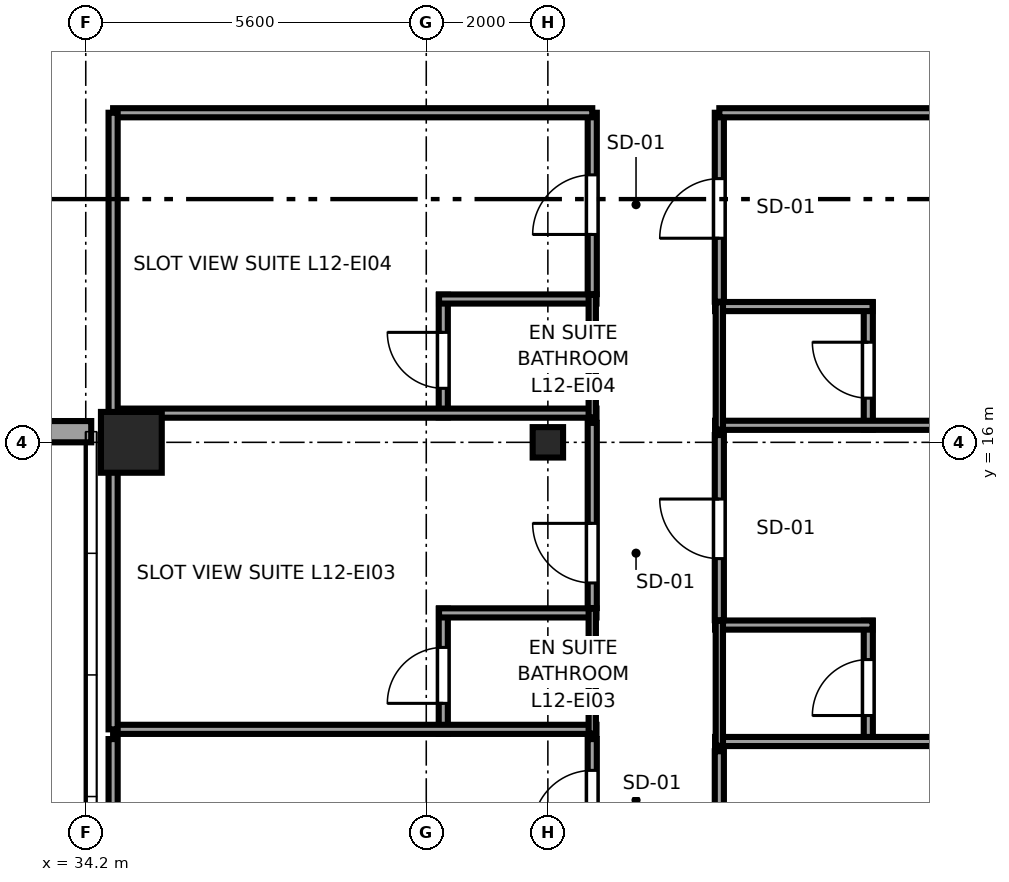
"""IFC4 building model, lengths in metres.
Left out: names, types, materials, properties, quantities, classifications, styles, units other than length and angle.
Written with IfcOpenShell. Run it as: python <this file> out.ifc"""

import sys

from ifc_helpers import new_model, si_unit, direction, frame, frame_2d, origin, origin_2d, place, context, subcontext, project, spatial, rectangle, i_section, extrude, source, transform, mapped, element, fill, save


model = new_model("IFC4")
c1 = context("Model", 3, precision=1e-05, world=origin(), true_north=direction((0.0, 1.0)))
c2 = subcontext(c1, "Body", "Model", "MODEL_VIEW")
j1 = project(units=[si_unit("LENGTHUNIT", "METRE"), si_unit("PLANEANGLEUNIT", "RADIAN")], contexts=[c1])
p1 = place(None, origin())
s1 = spatial("IfcSite", under=j1, at=p1, CompositionType="ELEMENT")
p2 = place(p1, origin())
s2 = spatial("IfcBuilding", under=s1, at=p2, CompositionType="ELEMENT")
p3 = place(p2, frame((0.0, 0.0, 53.3)))
s3 = spatial("IfcBuildingStorey", under=s2, at=p3, CompositionType="ELEMENT", Elevation=53.3)
m1 = source(origin(), c2, "Body", "SweptSolid", [
    extrude(rectangle(XDim=1.0, YDim=1.0, at=origin_2d()), origin(), (0.0, 0.0, 1.0), 3.55),
])
p4 = place(p3, frame((34.95, 16.0, 0.0), z_axis=(0.0, 0.0, 1.0), x_axis=(1.0, 0.0, 0.0)))
e1 = element("IfcColumn", 1, at=p4, inside=s3, PredefinedType="COLUMN", context=c2, shape_type="MappedRepresentation", body=[
    mapped(m1, transform((0.0, 0.0, 0.0), x_axis=(1.0, 0.0, 0.0), y_axis=(0.0, 1.0, 0.0), z_axis=(0.0, 0.0, 1.0), scale=1.0)),
])
m2 = source(origin(), c2, "Body", "SweptSolid", [
    extrude(i_section(OverallWidth=0.5, OverallDepth=0.5, WebThickness=0.028, FlangeThickness=0.045, at=origin_2d()), origin(), (0.0, 0.0, 1.0), 3.55),
])
p5 = place(p3, frame((41.8, 16.0, 0.0), z_axis=(0.0, 0.0, 1.0), x_axis=(1.0, 0.0, 0.0)))
e2 = element("IfcColumn", 2, at=p5, inside=s3, PredefinedType="COLUMN", context=c2, shape_type="MappedRepresentation", body=[
    mapped(m2, transform((0.0, 0.0, 0.0), x_axis=(1.0, 0.0, 0.0), y_axis=(0.0, 1.0, 0.0), z_axis=(0.0, 0.0, 1.0), scale=1.0)),
])
p6 = place(p3, frame((22.71, 16.175, 0.0), z_axis=(0.0, 0.0, 1.0), x_axis=(1.0, 0.0, 0.0)))
e3 = element("IfcWall", 3, at=p6, inside=s3, PredefinedType="SOLIDWALL", context=c2, shape_type="SweptSolid", body=[
    extrude(rectangle(XDim=11.58, YDim=0.35, at=frame_2d((5.79, 0.0))), origin(), (0.0, 0.0, 1.0), 2.748),
])
p7 = place(p6, frame((2.145, 0.0, 0.68)))
e4 = element("IfcOpeningElement", 4, at=p7, cuts=e3, PredefinedType="OPENING", context=c2, shape_type="SweptSolid", body=[
    extrude(rectangle(XDim=2.1, YDim=1.9, at=frame_2d((1.05, 0.95))), frame((0.0, 0.185, 0.0), z_axis=(0.0, -1.0, 0.0), x_axis=(1.0, 0.0, 0.0)), (0.0, 0.0, 1.0), 0.37),
])
p8 = place(p6, frame((7.335, 0.0, 0.68)))
e5 = element("IfcOpeningElement", 5, at=p8, cuts=e3, PredefinedType="OPENING", context=c2, shape_type="SweptSolid", body=[
    extrude(rectangle(XDim=2.1, YDim=1.9, at=frame_2d((1.05, 0.95))), frame((0.0, 0.185, 0.0), z_axis=(0.0, -1.0, 0.0), x_axis=(1.0, 0.0, 0.0)), (0.0, 0.0, 1.0), 0.37),
])
p9 = place(p3, frame((40.08, 11.21, 0.0), z_axis=(0.0, 0.0, 1.0), x_axis=(0.0, 1.0, 0.0)))
e6 = element("IfcWall", 6, at=p9, inside=s3, PredefinedType="PARTITIONING", context=c2, shape_type="SweptSolid", body=[
    extrude(rectangle(XDim=2.055, YDim=0.15, at=frame_2d((1.027, 0.0))), origin(), (0.0, 0.0, 1.0), 3.37),
])
p10 = place(p9, frame((0.498, 0.0, 0.0)))
e7 = element("IfcOpeningElement", 7, at=p10, cuts=e6, PredefinedType="OPENING", context=c2, shape_type="SweptSolid", body=[
    extrude(rectangle(XDim=0.92, YDim=2.01, at=frame_2d((0.46, 1.005))), frame((0.0, 0.085, 0.0), z_axis=(0.0, -1.0, 0.0), x_axis=(1.0, 0.0, 0.0)), (0.0, 0.0, 1.0), 0.17),
])
p11 = place(p3, frame((34.65, 11.28, 0.0), z_axis=(0.0, 0.0, 1.0), x_axis=(1.0, 0.0, 0.0)))
e8 = element("IfcWall", 8, at=p11, inside=s3, PredefinedType="PARTITIONING", context=c2, shape_type="SweptSolid", body=[
    extrude(rectangle(XDim=7.95, YDim=0.15, at=frame_2d((3.975, 0.0))), origin(), (0.0, 0.0, 1.0), 3.37),
])
p12 = place(p3, frame((40.01, 13.195, 0.0), z_axis=(0.0, 0.0, 1.0), x_axis=(1.0, 0.0, 0.0)))
e9 = element("IfcWall", 9, at=p12, inside=s3, PredefinedType="PARTITIONING", context=c2, shape_type="SweptSolid", body=[
    extrude(rectangle(XDim=2.59, YDim=0.15, at=frame_2d((1.295, 0.0))), origin(), (0.0, 0.0, 1.0), 3.37),
])
p13 = place(p3, frame((42.53, 11.21, 0.0), z_axis=(0.0, 0.0, 1.0), x_axis=(0.0, 1.0, 0.0)))
e10 = element("IfcWall", 10, at=p13, inside=s3, PredefinedType="PLUMBINGWALL", context=c2, shape_type="SweptSolid", body=[
    extrude(rectangle(XDim=2.055, YDim=0.12, at=frame_2d((1.027, 0.0))), origin(), (0.0, 0.0, 1.0), 3.37),
])
p14 = place(p3, frame((40.08, 16.41, 0.0), z_axis=(0.0, 0.0, 1.0), x_axis=(0.0, 1.0, 0.0)))
e11 = element("IfcWall", 11, at=p14, inside=s3, PredefinedType="PARTITIONING", context=c2, shape_type="SweptSolid", body=[
    extrude(rectangle(XDim=2.017, YDim=0.15, at=frame_2d((1.009, 0.0))), origin(), (0.0, 0.0, 1.0), 3.37),
])
p15 = place(p14, frame((0.479, 0.0, 0.0)))
e12 = element("IfcOpeningElement", 12, at=p15, cuts=e11, PredefinedType="OPENING", context=c2, shape_type="SweptSolid", body=[
    extrude(rectangle(XDim=0.92, YDim=2.01, at=frame_2d((0.46, 1.005))), frame((0.0, 0.085, 0.0), z_axis=(0.0, -1.0, 0.0), x_axis=(1.0, 0.0, 0.0)), (0.0, 0.0, 1.0), 0.17),
])
p16 = place(p3, frame((34.65, 16.48, 0.0), z_axis=(0.0, 0.0, 1.0), x_axis=(1.0, 0.0, 0.0)))
e13 = element("IfcWall", 13, at=p16, inside=s3, PredefinedType="PARTITIONING", context=c2, shape_type="SweptSolid", body=[
    extrude(rectangle(XDim=7.95, YDim=0.15, at=frame_2d((3.975, 0.0))), origin(), (0.0, 0.0, 1.0), 3.37),
])
p17 = place(p3, frame((40.01, 18.357, 0.0), z_axis=(0.0, 0.0, 1.0), x_axis=(1.0, 0.0, 0.0)))
e14 = element("IfcWall", 14, at=p17, inside=s3, PredefinedType="PARTITIONING", context=c2, shape_type="SweptSolid", body=[
    extrude(rectangle(XDim=2.59, YDim=0.15, at=frame_2d((1.295, 0.0))), origin(), (0.0, 0.0, 1.0), 3.37),
])
p18 = place(p3, frame((42.53, 16.41, 0.0), z_axis=(0.0, 0.0, 1.0), x_axis=(0.0, 1.0, 0.0)))
e15 = element("IfcWall", 15, at=p18, inside=s3, PredefinedType="PLUMBINGWALL", context=c2, shape_type="SweptSolid", body=[
    extrude(rectangle(XDim=2.017, YDim=0.12, at=frame_2d((1.009, 0.0))), origin(), (0.0, 0.0, 1.0), 3.37),
])
p19 = place(p3, frame((47.07, 11.01, 0.0), z_axis=(0.0, 0.0, 1.0), x_axis=(0.0, 1.0, 0.0)))
e16 = element("IfcWall", 16, at=p19, inside=s3, PredefinedType="PARTITIONING", context=c2, shape_type="SweptSolid", body=[
    extrude(rectangle(XDim=2.055, YDim=0.15, at=frame_2d((1.027, 0.0))), origin(), (0.0, 0.0, 1.0), 3.37),
])
p20 = place(p19, frame((0.498, 0.0, 0.0)))
e17 = element("IfcOpeningElement", 17, at=p20, cuts=e16, PredefinedType="OPENING", context=c2, shape_type="SweptSolid", body=[
    extrude(rectangle(XDim=0.92, YDim=2.01, at=frame_2d((0.46, 1.005))), frame((0.0, 0.085, 0.0), z_axis=(0.0, -1.0, 0.0), x_axis=(1.0, 0.0, 0.0)), (0.0, 0.0, 1.0), 0.17),
])
p21 = place(p3, frame((44.55, 11.08, 0.0), z_axis=(0.0, 0.0, 1.0), x_axis=(1.0, 0.0, 0.0)))
e18 = element("IfcWall", 18, at=p21, inside=s3, PredefinedType="PARTITIONING", context=c2, shape_type="SweptSolid", body=[
    extrude(rectangle(XDim=12.045, YDim=0.15, at=frame_2d((6.022, 0.0))), origin(), (0.0, 0.0, 1.0), 3.37),
])
p22 = place(p3, frame((44.55, 12.995, 0.0), z_axis=(0.0, 0.0, 1.0), x_axis=(1.0, 0.0, 0.0)))
e19 = element("IfcWall", 19, at=p22, inside=s3, PredefinedType="PARTITIONING", context=c2, shape_type="SweptSolid", body=[
    extrude(rectangle(XDim=2.59, YDim=0.15, at=frame_2d((1.295, 0.0))), origin(), (0.0, 0.0, 1.0), 3.37),
])
p23 = place(p3, frame((44.62, 11.01, 0.0), z_axis=(0.0, 0.0, 1.0), x_axis=(0.0, 1.0, 0.0)))
e20 = element("IfcWall", 20, at=p23, inside=s3, PredefinedType="PLUMBINGWALL", context=c2, shape_type="SweptSolid", body=[
    extrude(rectangle(XDim=2.055, YDim=0.12, at=frame_2d((1.027, 0.0))), origin(), (0.0, 0.0, 1.0), 3.37),
])
p24 = place(p3, frame((47.07, 16.21, 0.0), z_axis=(0.0, 0.0, 1.0), x_axis=(0.0, 1.0, 0.0)))
e21 = element("IfcWall", 21, at=p24, inside=s3, PredefinedType="PARTITIONING", context=c2, shape_type="SweptSolid", body=[
    extrude(rectangle(XDim=2.093, YDim=0.15, at=frame_2d((1.046, 0.0))), origin(), (0.0, 0.0, 1.0), 3.37),
])
p25 = place(p24, frame((0.517, 0.0, 0.0)))
e22 = element("IfcOpeningElement", 22, at=p25, cuts=e21, PredefinedType="OPENING", context=c2, shape_type="SweptSolid", body=[
    extrude(rectangle(XDim=0.92, YDim=2.01, at=frame_2d((0.46, 1.005))), frame((0.0, 0.085, 0.0), z_axis=(0.0, -1.0, 0.0), x_axis=(1.0, 0.0, 0.0)), (0.0, 0.0, 1.0), 0.17),
])
p26 = place(p3, frame((44.55, 16.28, 0.0), z_axis=(0.0, 0.0, 1.0), x_axis=(1.0, 0.0, 0.0)))
e23 = element("IfcWall", 23, at=p26, inside=s3, PredefinedType="PARTITIONING", context=c2, shape_type="SweptSolid", body=[
    extrude(rectangle(XDim=12.045, YDim=0.15, at=frame_2d((6.022, 0.0))), origin(), (0.0, 0.0, 1.0), 3.37),
])
p27 = place(p3, frame((44.55, 18.233, 0.0), z_axis=(0.0, 0.0, 1.0), x_axis=(1.0, 0.0, 0.0)))
e24 = element("IfcWall", 24, at=p27, inside=s3, PredefinedType="PARTITIONING", context=c2, shape_type="SweptSolid", body=[
    extrude(rectangle(XDim=2.59, YDim=0.15, at=frame_2d((1.295, 0.0))), origin(), (0.0, 0.0, 1.0), 3.37),
])
p28 = place(p3, frame((44.62, 16.21, 0.0), z_axis=(0.0, 0.0, 1.0), x_axis=(0.0, 1.0, 0.0)))
e25 = element("IfcWall", 25, at=p28, inside=s3, PredefinedType="PLUMBINGWALL", context=c2, shape_type="SweptSolid", body=[
    extrude(rectangle(XDim=2.093, YDim=0.12, at=frame_2d((1.046, 0.0))), origin(), (0.0, 0.0, 1.0), 3.37),
])
p29 = place(p3, frame((42.53, 7.951, 0.0), z_axis=(0.0, 0.0, 1.0), x_axis=(0.0, 1.0, 0.0)))
e26 = element("IfcWall", 26, at=p29, inside=s3, PredefinedType="PARTITIONING", context=c2, shape_type="SweptSolid", body=[
    extrude(rectangle(XDim=3.169, YDim=0.15, at=frame_2d((1.584, 0.0))), origin(), (0.0, 0.0, 1.0), 3.37),
])
p30 = place(p29, frame((1.675, 0.0, 0.0)))
e27 = element("IfcOpeningElement", 27, at=p30, cuts=e26, PredefinedType="OPENING", context=c2, shape_type="SweptSolid", body=[
    extrude(rectangle(XDim=0.98, YDim=2.12, at=frame_2d((0.49, 1.06))), frame((0.0, 0.085, 0.0), z_axis=(0.0, -1.0, 0.0), x_axis=(1.0, 0.0, 0.0)), (0.0, 0.0, 1.0), 0.17),
])
p31 = place(p3, frame((34.65, 5.88, 0.0), z_axis=(0.0, 0.0, 1.0), x_axis=(0.0, 1.0, 0.0)))
e28 = element("IfcWall", 28, at=p31, inside=s3, PredefinedType="PARTITIONING", context=c2, shape_type="SweptSolid", body=[
    extrude(rectangle(XDim=5.24, YDim=0.15, at=frame_2d((2.62, 0.0))), origin(), (0.0, 0.0, 1.0), 3.37),
])
p32 = place(p3, frame((42.53, 13.275, 0.0), z_axis=(0.0, 0.0, 1.0), x_axis=(0.0, 1.0, 0.0)))
e29 = element("IfcWall", 29, at=p32, inside=s3, PredefinedType="PARTITIONING", context=c2, shape_type="SweptSolid", body=[
    extrude(rectangle(XDim=3.045, YDim=0.15, at=frame_2d((1.522, 0.0))), origin(), (0.0, 0.0, 1.0), 3.37),
])
p33 = place(p32, frame((0.413, 0.0, 0.0)))
e30 = element("IfcOpeningElement", 30, at=p33, cuts=e29, PredefinedType="OPENING", context=c2, shape_type="SweptSolid", body=[
    extrude(rectangle(XDim=0.98, YDim=2.12, at=frame_2d((0.49, 1.06))), frame((0.0, 0.085, 0.0), z_axis=(0.0, -1.0, 0.0), x_axis=(1.0, 0.0, 0.0)), (0.0, 0.0, 1.0), 0.17),
])
p34 = place(p3, frame((34.65, 11.28, 0.0), z_axis=(0.0, 0.0, 1.0), x_axis=(0.0, 1.0, 0.0)))
e31 = element("IfcWall", 31, at=p34, inside=s3, PredefinedType="PARTITIONING", context=c2, shape_type="SweptSolid", body=[
    extrude(rectangle(XDim=5.04, YDim=0.15, at=frame_2d((2.52, 0.0))), origin(), (0.0, 0.0, 1.0), 3.37),
])
p35 = place(p3, frame((42.53, 18.437, 0.0), z_axis=(0.0, 0.0, 1.0), x_axis=(0.0, 1.0, 0.0)))
e32 = element("IfcWall", 32, at=p35, inside=s3, PredefinedType="PARTITIONING", context=c2, shape_type="SweptSolid", body=[
    extrude(rectangle(XDim=2.983, YDim=0.15, at=frame_2d((1.491, 0.0))), origin(), (0.0, 0.0, 1.0), 3.37),
])
p36 = place(p35, frame((0.981, 0.0, 0.0)))
e33 = element("IfcOpeningElement", 33, at=p36, cuts=e32, PredefinedType="OPENING", context=c2, shape_type="SweptSolid", body=[
    extrude(rectangle(XDim=0.98, YDim=2.12, at=frame_2d((0.49, 1.06))), frame((0.0, 0.085, 0.0), z_axis=(0.0, -1.0, 0.0), x_axis=(1.0, 0.0, 0.0)), (0.0, 0.0, 1.0), 0.17),
])
p37 = place(p3, frame((34.65, 21.42, 0.0), z_axis=(0.0, 0.0, 1.0), x_axis=(1.0, 0.0, 0.0)))
e34 = element("IfcWall", 34, at=p37, inside=s3, PredefinedType="PARTITIONING", context=c2, shape_type="SweptSolid", body=[
    extrude(rectangle(XDim=7.88, YDim=0.15, at=frame_2d((3.94, 0.0))), origin(), (0.0, 0.0, 1.0), 3.37),
])
p38 = place(p3, frame((34.65, 16.48, 0.0), z_axis=(0.0, 0.0, 1.0), x_axis=(0.0, 1.0, 0.0)))
e35 = element("IfcWall", 35, at=p38, inside=s3, PredefinedType="PARTITIONING", context=c2, shape_type="SweptSolid", body=[
    extrude(rectangle(XDim=4.94, YDim=0.15, at=frame_2d((2.47, 0.0))), origin(), (0.0, 0.0, 1.0), 3.37),
])
p39 = place(p3, frame((44.62, 7.751, 0.0), z_axis=(0.0, 0.0, 1.0), x_axis=(0.0, 1.0, 0.0)))
e36 = element("IfcWall", 36, at=p39, inside=s3, PredefinedType="PARTITIONING", context=c2, shape_type="SweptSolid", body=[
    extrude(rectangle(XDim=3.169, YDim=0.15, at=frame_2d((1.584, 0.0))), origin(), (0.0, 0.0, 1.0), 3.37),
])
p40 = place(p39, frame((1.074, 0.0, 0.0)))
e37 = element("IfcOpeningElement", 37, at=p40, cuts=e36, PredefinedType="OPENING", context=c2, shape_type="SweptSolid", body=[
    extrude(rectangle(XDim=0.98, YDim=2.12, at=frame_2d((0.49, 1.06))), frame((0.0, 0.085, 0.0), z_axis=(0.0, -1.0, 0.0), x_axis=(1.0, 0.0, 0.0)), (0.0, 0.0, 1.0), 0.17),
])
p41 = place(p3, frame((44.62, 13.075, 0.0), z_axis=(0.0, 0.0, 1.0), x_axis=(0.0, 1.0, 0.0)))
e38 = element("IfcWall", 38, at=p41, inside=s3, PredefinedType="PARTITIONING", context=c2, shape_type="SweptSolid", body=[
    extrude(rectangle(XDim=3.045, YDim=0.15, at=frame_2d((1.522, 0.0))), origin(), (0.0, 0.0, 1.0), 3.37),
])
p42 = place(p41, frame((1.012, 0.0, 0.0)))
e39 = element("IfcOpeningElement", 39, at=p42, cuts=e38, PredefinedType="OPENING", context=c2, shape_type="SweptSolid", body=[
    extrude(rectangle(XDim=0.98, YDim=2.12, at=frame_2d((0.49, 1.06))), frame((0.0, 0.085, 0.0), z_axis=(0.0, -1.0, 0.0), x_axis=(1.0, 0.0, 0.0)), (0.0, 0.0, 1.0), 0.17),
])
p43 = place(p3, frame((44.62, 18.313, 0.0), z_axis=(0.0, 0.0, 1.0), x_axis=(0.0, 1.0, 0.0)))
e40 = element("IfcWall", 40, at=p43, inside=s3, PredefinedType="PARTITIONING", context=c2, shape_type="SweptSolid", body=[
    extrude(rectangle(XDim=3.107, YDim=0.15, at=frame_2d((1.553, 0.0))), origin(), (0.0, 0.0, 1.0), 3.37),
])
p44 = place(p43, frame((1.043, 0.0, 0.0)))
e41 = element("IfcOpeningElement", 41, at=p44, cuts=e40, PredefinedType="OPENING", context=c2, shape_type="SweptSolid", body=[
    extrude(rectangle(XDim=0.98, YDim=2.12, at=frame_2d((0.49, 1.06))), frame((0.0, 0.085, 0.0), z_axis=(0.0, -1.0, 0.0), x_axis=(1.0, 0.0, 0.0)), (0.0, 0.0, 1.0), 0.17),
])
p45 = place(p3, frame((44.62, 21.42, 0.0), z_axis=(0.0, 0.0, 1.0), x_axis=(1.0, 0.0, 0.0)))
e42 = element("IfcWall", 42, at=p45, inside=s3, PredefinedType="PARTITIONING", context=c2, shape_type="SweptSolid", body=[
    extrude(rectangle(XDim=11.975, YDim=0.15, at=frame_2d((5.987, 0.0))), origin(), (0.0, 0.0, 1.0), 3.37),
])
m3 = source(origin(), c2, "Body", "SweptSolid", [
    extrude(rectangle(XDim=0.92, YDim=2.01, at=frame_2d((0.46, 1.005))), frame((0.0, 0.025, 0.0), z_axis=(0.0, -1.0, 0.0), x_axis=(1.0, 0.0, 0.0)), (0.0, 0.0, 1.0), 0.05),
])
p46 = place(p10, origin())
e43 = element("IfcDoor", 43, at=p46, inside=s3, OperationType="SINGLE_SWING_LEFT", PredefinedType="DOOR", context=c2, shape_type="MappedRepresentation", body=[
    mapped(m3, transform((0.0, 0.0, 0.0), x_axis=(1.0, 0.0, 0.0), y_axis=(0.0, 1.0, 0.0), z_axis=(0.0, 0.0, 1.0), scale=1.0)),
])
fill(e7, e43)
p47 = place(p15, origin())
e44 = element("IfcDoor", 44, at=p47, inside=s3, OperationType="SINGLE_SWING_RIGHT", PredefinedType="DOOR", context=c2, shape_type="MappedRepresentation", body=[
    mapped(m3, transform((0.0, 0.0, 0.0), x_axis=(1.0, 0.0, 0.0), y_axis=(0.0, 1.0, 0.0), z_axis=(0.0, 0.0, 1.0), scale=1.0)),
])
fill(e12, e44)
p48 = place(p20, origin())
e45 = element("IfcDoor", 45, at=p48, inside=s3, OperationType="SINGLE_SWING_LEFT", PredefinedType="DOOR", context=c2, shape_type="MappedRepresentation", body=[
    mapped(m3, transform((0.0, 0.0, 0.0), x_axis=(1.0, 0.0, 0.0), y_axis=(0.0, 1.0, 0.0), z_axis=(0.0, 0.0, 1.0), scale=1.0)),
])
fill(e17, e45)
p49 = place(p25, origin())
e46 = element("IfcDoor", 46, at=p49, inside=s3, OperationType="SINGLE_SWING_RIGHT", PredefinedType="DOOR", context=c2, shape_type="MappedRepresentation", body=[
    mapped(m3, transform((0.0, 0.0, 0.0), x_axis=(1.0, 0.0, 0.0), y_axis=(0.0, 1.0, 0.0), z_axis=(0.0, 0.0, 1.0), scale=1.0)),
])
fill(e22, e46)
m4 = source(origin(), c2, "Body", "SweptSolid", [
    extrude(rectangle(XDim=0.98, YDim=2.12, at=frame_2d((0.49, 1.06))), frame((0.0, 0.025, 0.0), z_axis=(0.0, -1.0, 0.0), x_axis=(1.0, 0.0, 0.0)), (0.0, 0.0, 1.0), 0.05),
])
p50 = place(p30, origin())
e47 = element("IfcDoor", 47, at=p50, inside=s3, OperationType="SINGLE_SWING_LEFT", PredefinedType="DOOR", context=c2, shape_type="MappedRepresentation", body=[
    mapped(m4, transform((0.0, 0.0, 0.0), x_axis=(1.0, 0.0, 0.0), y_axis=(0.0, 1.0, 0.0), z_axis=(0.0, 0.0, 1.0), scale=1.0)),
])
fill(e27, e47)
p51 = place(p33, origin())
e48 = element("IfcDoor", 48, at=p51, inside=s3, OperationType="SINGLE_SWING_RIGHT", PredefinedType="DOOR", context=c2, shape_type="MappedRepresentation", body=[
    mapped(m4, transform((0.0, 0.0, 0.0), x_axis=(1.0, 0.0, 0.0), y_axis=(0.0, 1.0, 0.0), z_axis=(0.0, 0.0, 1.0), scale=1.0)),
])
fill(e30, e48)
p52 = place(p36, origin())
e49 = element("IfcDoor", 49, at=p52, inside=s3, OperationType="SINGLE_SWING_LEFT", PredefinedType="DOOR", context=c2, shape_type="MappedRepresentation", body=[
    mapped(m4, transform((0.0, 0.0, 0.0), x_axis=(1.0, 0.0, 0.0), y_axis=(0.0, 1.0, 0.0), z_axis=(0.0, 0.0, 1.0), scale=1.0)),
])
fill(e33, e49)
p53 = place(p42, origin())
e50 = element("IfcDoor", 50, at=p53, inside=s3, OperationType="SINGLE_SWING_RIGHT", PredefinedType="DOOR", context=c2, shape_type="MappedRepresentation", body=[
    mapped(m4, transform((0.0, 0.0, 0.0), x_axis=(1.0, 0.0, 0.0), y_axis=(0.0, 1.0, 0.0), z_axis=(0.0, 0.0, 1.0), scale=1.0)),
])
fill(e39, e50)
p54 = place(p44, origin())
e51 = element("IfcDoor", 51, at=p54, inside=s3, OperationType="SINGLE_SWING_LEFT", PredefinedType="DOOR", context=c2, shape_type="MappedRepresentation", body=[
    mapped(m4, transform((0.0, 0.0, 0.0), x_axis=(1.0, 0.0, 0.0), y_axis=(0.0, 1.0, 0.0), z_axis=(0.0, 0.0, 1.0), scale=1.0)),
])
fill(e41, e51)
save(model, sys.argv[1])
